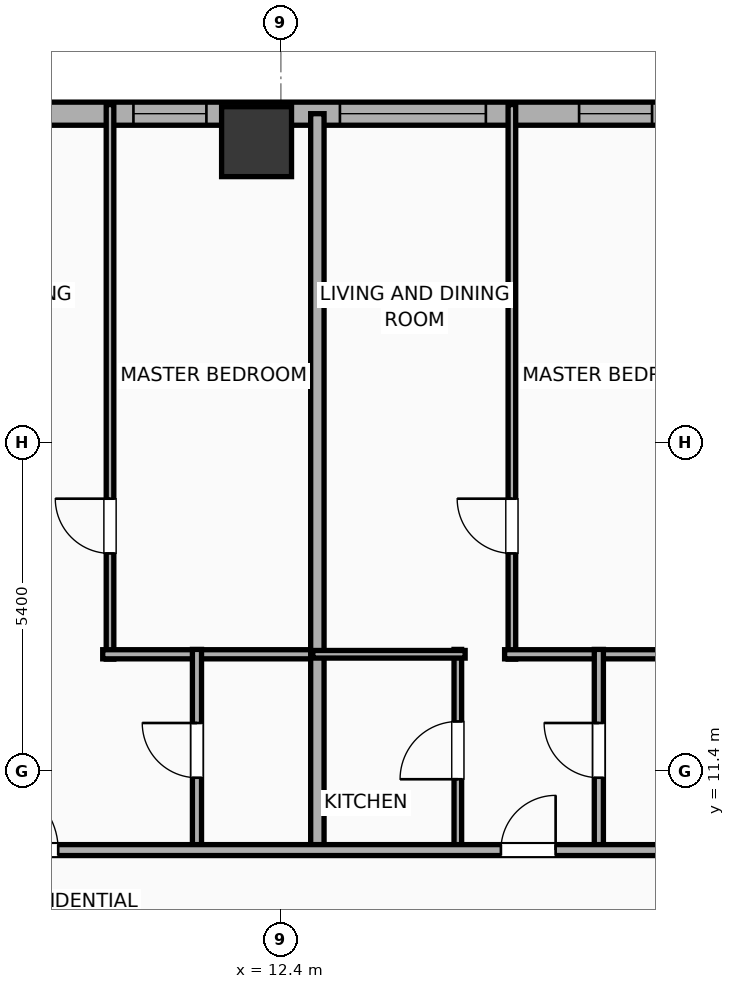
"""IFC4 building model, lengths in metres.
Left out: names, types, materials, properties, quantities, classifications, styles, units other than length and angle.
Written with IfcOpenShell. Run it as: python <this file> out.ifc"""

import sys

from ifc_helpers import new_model, si_unit, direction, frame, frame_2d, origin, origin_2d, place, context, subcontext, project, spatial, rectangle, hollow_rectangle, extrude, element, fill, save


model = new_model("IFC4")
c1 = context("Model", 3, precision=1e-05, world=origin(), true_north=direction((0.0, 1.0)))
c2 = subcontext(c1, "Body", "Model", "MODEL_VIEW")
j1 = project(units=[si_unit("LENGTHUNIT", "METRE"), si_unit("PLANEANGLEUNIT", "RADIAN")], contexts=[c1])
p1 = place(None, origin())
s1 = spatial("IfcSite", under=j1, at=p1, CompositionType="ELEMENT")
p2 = place(p1, origin())
s2 = spatial("IfcBuilding", under=s1, at=p2, CompositionType="ELEMENT")
p3 = place(p2, frame((0.0, 0.0, 45.5)))
s3 = spatial("IfcBuildingStorey", under=s2, at=p3, CompositionType="ELEMENT", Elevation=45.5)
p4 = place(p3, frame((12.0, 21.75, 0.0), z_axis=(0.0, 0.0, 1.0), x_axis=(1.0, 0.0, 0.0)))
e1 = element("IfcColumn", 1, at=p4, inside=s3, PredefinedType="COLUMN", context=c2, shape_type="SweptSolid", body=[
    extrude(hollow_rectangle(XDim=1.15, YDim=1.15, WallThickness=0.04, at=origin_2d()), origin(), (0.0, 0.0, 1.0), 3.9),
])
p5 = place(p3, frame((-29.581, 22.21, 0.0), z_axis=(0.0, 0.0, 1.0), x_axis=(1.0, 0.0, 0.0)))
e2 = element("IfcWall", 2, at=p5, inside=s3, PredefinedType="ELEMENTEDWALL", context=c2, shape_type="SweptSolid", body=[
    extrude(rectangle(XDim=51.963, YDim=0.38, at=frame_2d((25.981, 0.0))), origin(), (0.0, 0.0, 1.0), 3.65),
])
p6 = place(p5, frame((25.631, 0.0, 0.75)))
e3 = element("IfcOpeningElement", 3, at=p6, cuts=e2, PredefinedType="OPENING", context=c2, shape_type="SweptSolid", body=[
    extrude(rectangle(XDim=2.4, YDim=2.1, at=frame_2d((1.2, 1.05))), frame((0.0, 0.2, 0.0), z_axis=(0.0, -1.0, 0.0), x_axis=(1.0, 0.0, 0.0)), (0.0, 0.0, 1.0), 0.4),
])
p7 = place(p5, frame((42.952, 0.0, 0.75)))
e4 = element("IfcOpeningElement", 4, at=p7, cuts=e2, PredefinedType="OPENING", context=c2, shape_type="SweptSolid", body=[
    extrude(rectangle(XDim=2.4, YDim=2.1, at=frame_2d((1.2, 1.05))), frame((0.0, 0.2, 0.0), z_axis=(0.0, -1.0, 0.0), x_axis=(1.0, 0.0, 0.0)), (0.0, 0.0, 1.0), 0.4),
])
p8 = place(p5, frame((1.731, 0.0, 0.75)))
e5 = element("IfcOpeningElement", 5, at=p8, cuts=e2, PredefinedType="OPENING", context=c2, shape_type="SweptSolid", body=[
    extrude(rectangle(XDim=1.2, YDim=2.05, at=frame_2d((0.6, 1.025))), frame((0.0, 0.2, 0.0), z_axis=(0.0, -1.0, 0.0), x_axis=(1.0, 0.0, 0.0)), (0.0, 0.0, 1.0), 0.4),
])
p9 = place(p5, frame((5.272, 0.0, 0.75)))
e6 = element("IfcOpeningElement", 6, at=p9, cuts=e2, PredefinedType="OPENING", context=c2, shape_type="SweptSolid", body=[
    extrude(rectangle(XDim=1.2, YDim=2.05, at=frame_2d((0.6, 1.025))), frame((0.0, 0.2, 0.0), z_axis=(0.0, -1.0, 0.0), x_axis=(1.0, 0.0, 0.0)), (0.0, 0.0, 1.0), 0.4),
])
p10 = place(p5, frame((8.356, 0.0, 0.75)))
e7 = element("IfcOpeningElement", 7, at=p10, cuts=e2, PredefinedType="OPENING", context=c2, shape_type="SweptSolid", body=[
    extrude(rectangle(XDim=1.2, YDim=2.05, at=frame_2d((0.6, 1.025))), frame((0.0, 0.2, 0.0), z_axis=(0.0, -1.0, 0.0), x_axis=(1.0, 0.0, 0.0)), (0.0, 0.0, 1.0), 0.4),
])
p11 = place(p5, frame((15.632, 0.0, 0.75)))
e8 = element("IfcOpeningElement", 8, at=p11, cuts=e2, PredefinedType="OPENING", context=c2, shape_type="SweptSolid", body=[
    extrude(rectangle(XDim=1.2, YDim=2.05, at=frame_2d((0.6, 1.025))), frame((0.0, 0.2, 0.0), z_axis=(0.0, -1.0, 0.0), x_axis=(1.0, 0.0, 0.0)), (0.0, 0.0, 1.0), 0.4),
])
p12 = place(p5, frame((12.137, 0.0, 0.75)))
e9 = element("IfcOpeningElement", 9, at=p12, cuts=e2, PredefinedType="OPENING", context=c2, shape_type="SweptSolid", body=[
    extrude(rectangle(XDim=1.2, YDim=2.05, at=frame_2d((0.6, 1.025))), frame((0.0, 0.2, 0.0), z_axis=(0.0, -1.0, 0.0), x_axis=(1.0, 0.0, 0.0)), (0.0, 0.0, 1.0), 0.4),
])
p13 = place(p5, frame((18.756, 0.0, 0.75)))
e10 = element("IfcOpeningElement", 10, at=p13, cuts=e2, PredefinedType="OPENING", context=c2, shape_type="SweptSolid", body=[
    extrude(rectangle(XDim=1.2, YDim=2.05, at=frame_2d((0.6, 1.025))), frame((0.0, 0.2, 0.0), z_axis=(0.0, -1.0, 0.0), x_axis=(1.0, 0.0, 0.0)), (0.0, 0.0, 1.0), 0.4),
])
p14 = place(p5, frame((22.907, 0.0, 0.75)))
e11 = element("IfcOpeningElement", 11, at=p14, cuts=e2, PredefinedType="OPENING", context=c2, shape_type="SweptSolid", body=[
    extrude(rectangle(XDim=1.2, YDim=2.05, at=frame_2d((0.6, 1.025))), frame((0.0, 0.2, 0.0), z_axis=(0.0, -1.0, 0.0), x_axis=(1.0, 0.0, 0.0)), (0.0, 0.0, 1.0), 0.4),
])
p15 = place(p5, frame((36.381, 0.0, 0.75)))
e12 = element("IfcOpeningElement", 12, at=p15, cuts=e2, PredefinedType="OPENING", context=c2, shape_type="SweptSolid", body=[
    extrude(rectangle(XDim=1.2, YDim=2.05, at=frame_2d((0.6, 1.025))), frame((0.0, 0.2, 0.0), z_axis=(0.0, -1.0, 0.0), x_axis=(1.0, 0.0, 0.0)), (0.0, 0.0, 1.0), 0.4),
])
p16 = place(p5, frame((32.886, 0.0, 0.75)))
e13 = element("IfcOpeningElement", 13, at=p16, cuts=e2, PredefinedType="OPENING", context=c2, shape_type="SweptSolid", body=[
    extrude(rectangle(XDim=1.2, YDim=2.05, at=frame_2d((0.6, 1.025))), frame((0.0, 0.2, 0.0), z_axis=(0.0, -1.0, 0.0), x_axis=(1.0, 0.0, 0.0)), (0.0, 0.0, 1.0), 0.4),
])
p17 = place(p5, frame((39.556, 0.0, 0.75)))
e14 = element("IfcOpeningElement", 14, at=p17, cuts=e2, PredefinedType="OPENING", context=c2, shape_type="SweptSolid", body=[
    extrude(rectangle(XDim=1.2, YDim=2.05, at=frame_2d((0.6, 1.025))), frame((0.0, 0.2, 0.0), z_axis=(0.0, -1.0, 0.0), x_axis=(1.0, 0.0, 0.0)), (0.0, 0.0, 1.0), 0.4),
])
p18 = place(p5, frame((46.885, 0.0, 0.75)))
e15 = element("IfcOpeningElement", 15, at=p18, cuts=e2, PredefinedType="OPENING", context=c2, shape_type="SweptSolid", body=[
    extrude(rectangle(XDim=1.2, YDim=2.05, at=frame_2d((0.6, 1.025))), frame((0.0, 0.2, 0.0), z_axis=(0.0, -1.0, 0.0), x_axis=(1.0, 0.0, 0.0)), (0.0, 0.0, 1.0), 0.4),
])
p19 = place(p5, frame((49.531, 0.0, 0.75)))
e16 = element("IfcOpeningElement", 16, at=p19, cuts=e2, PredefinedType="OPENING", context=c2, shape_type="SweptSolid", body=[
    extrude(rectangle(XDim=1.2, YDim=2.05, at=frame_2d((0.6, 1.025))), frame((0.0, 0.2, 0.0), z_axis=(0.0, -1.0, 0.0), x_axis=(1.0, 0.0, 0.0)), (0.0, 0.0, 1.0), 0.4),
])
p20 = place(p3, frame((9.59, 13.24, 0.0), z_axis=(0.0, 0.0, 1.0), x_axis=(0.0, 1.0, 0.0)))
e17 = element("IfcWall", 17, at=p20, inside=s3, PredefinedType="PARTITIONING", context=c2, shape_type="SweptSolid", body=[
    extrude(rectangle(XDim=9.12, YDim=0.125, at=frame_2d((4.56, 0.0))), origin(), (0.0, 0.0, 1.0), 3.65),
])
p21 = place(p20, frame((1.739, 0.0, 0.0)))
e18 = element("IfcOpeningElement", 18, at=p21, cuts=e17, PredefinedType="OPENING", context=c2, shape_type="SweptSolid", body=[
    extrude(rectangle(XDim=0.9, YDim=2.05, at=frame_2d((0.45, 1.025))), frame((0.0, 0.073, 0.0), z_axis=(0.0, -1.0, 0.0), x_axis=(1.0, 0.0, 0.0)), (0.0, 0.0, 1.0), 0.145),
])
p22 = place(p3, frame((9.47, 13.32, 0.0), z_axis=(0.0, 0.0, 1.0), x_axis=(1.0, 0.0, 0.0)))
e19 = element("IfcWall", 19, at=p22, inside=s3, PredefinedType="PLUMBINGWALL", context=c2, shape_type="SweptSolid", body=[
    extrude(rectangle(XDim=3.605, YDim=0.15, at=frame_2d((1.802, 0.0))), origin(), (0.0, 0.0, 1.0), 3.65),
])
p23 = place(p3, frame((11.02, 10.08, 0.0), z_axis=(0.0, 0.0, 1.0), x_axis=(0.0, 1.0, 0.0)))
e20 = element("IfcWall", 20, at=p23, inside=s3, PredefinedType="PLUMBINGWALL", context=c2, shape_type="SweptSolid", body=[
    extrude(rectangle(XDim=3.32, YDim=0.15, at=frame_2d((1.66, 0.0))), origin(), (0.0, 0.0, 1.0), 3.65),
])
p24 = place(p23, frame((1.21, 0.0, 0.0)))
e21 = element("IfcOpeningElement", 21, at=p24, cuts=e20, PredefinedType="OPENING", context=c2, shape_type="SweptSolid", body=[
    extrude(rectangle(XDim=0.9, YDim=2.05, at=frame_2d((0.45, 1.025))), frame((0.0, 0.085, 0.0), z_axis=(0.0, -1.0, 0.0), x_axis=(1.0, 0.0, 0.0)), (0.0, 0.0, 1.0), 0.17),
])
p25 = place(p3, frame((13.0, 10.02, 0.0), z_axis=(0.0, 0.0, 1.0), x_axis=(0.0, 1.0, 0.0)))
e22 = element("IfcWall", 22, at=p25, inside=s3, PredefinedType="PARTITIONING", context=c2, shape_type="SweptSolid", body=[
    extrude(rectangle(XDim=12.19, YDim=0.22, at=frame_2d((6.095, 0.0))), origin(), (0.0, 0.0, 1.0), 3.65),
])
p26 = place(p3, frame((16.199, 13.24, 0.0), z_axis=(0.0, 0.0, 1.0), x_axis=(0.0, 1.0, 0.0)))
e23 = element("IfcWall", 23, at=p26, inside=s3, PredefinedType="PARTITIONING", context=c2, shape_type="SweptSolid", body=[
    extrude(rectangle(XDim=9.12, YDim=0.125, at=frame_2d((4.56, 0.0))), origin(), (0.0, 0.0, 1.0), 3.65),
])
p27 = place(p26, frame((1.739, 0.0, 0.0)))
e24 = element("IfcOpeningElement", 24, at=p27, cuts=e23, PredefinedType="OPENING", context=c2, shape_type="SweptSolid", body=[
    extrude(rectangle(XDim=0.9, YDim=2.05, at=frame_2d((0.45, 1.025))), frame((0.0, 0.073, 0.0), z_axis=(0.0, -1.0, 0.0), x_axis=(1.0, 0.0, 0.0)), (0.0, 0.0, 1.0), 0.145),
])
p28 = place(p3, frame((16.079, 13.32, 0.0), z_axis=(0.0, 0.0, 1.0), x_axis=(1.0, 0.0, 0.0)))
e25 = element("IfcWall", 25, at=p28, inside=s3, PredefinedType="PLUMBINGWALL", context=c2, shape_type="SweptSolid", body=[
    extrude(rectangle(XDim=3.605, YDim=0.15, at=frame_2d((1.802, 0.0))), origin(), (0.0, 0.0, 1.0), 3.65),
])
p29 = place(p3, frame((15.31, 10.08, 0.0), z_axis=(0.0, 0.0, 1.0), x_axis=(0.0, 1.0, 0.0)))
e26 = element("IfcWall", 26, at=p29, inside=s3, PredefinedType="PARTITIONING", context=c2, shape_type="SweptSolid", body=[
    extrude(rectangle(XDim=3.32, YDim=0.125, at=frame_2d((1.66, 0.0))), origin(), (0.0, 0.0, 1.0), 3.65),
])
p30 = place(p29, frame((1.185, 0.0, 0.0)))
e27 = element("IfcOpeningElement", 27, at=p30, cuts=e26, PredefinedType="OPENING", context=c2, shape_type="SweptSolid", body=[
    extrude(rectangle(XDim=0.95, YDim=2.05, at=frame_2d((0.475, 1.025))), frame((0.0, 0.073, 0.0), z_axis=(0.0, -1.0, 0.0), x_axis=(1.0, 0.0, 0.0)), (0.0, 0.0, 1.0), 0.145),
])
p31 = place(p3, frame((12.925, 13.32, 0.0), z_axis=(0.0, 0.0, 1.0), x_axis=(1.0, 0.0, 0.0)))
e28 = element("IfcWall", 28, at=p31, inside=s3, PredefinedType="PARTITIONING", context=c2, shape_type="SweptSolid", body=[
    extrude(rectangle(XDim=2.505, YDim=0.125, at=frame_2d((1.252, 0.0))), origin(), (0.0, 0.0, 1.0), 3.65),
])
p32 = place(p3, frame((17.629, 10.08, 0.0), z_axis=(0.0, 0.0, 1.0), x_axis=(0.0, 1.0, 0.0)))
e29 = element("IfcWall", 29, at=p32, inside=s3, PredefinedType="PLUMBINGWALL", context=c2, shape_type="SweptSolid", body=[
    extrude(rectangle(XDim=3.32, YDim=0.15, at=frame_2d((1.66, 0.0))), origin(), (0.0, 0.0, 1.0), 3.65),
])
p33 = place(p32, frame((1.21, 0.0, 0.0)))
e30 = element("IfcOpeningElement", 30, at=p33, cuts=e29, PredefinedType="OPENING", context=c2, shape_type="SweptSolid", body=[
    extrude(rectangle(XDim=0.9, YDim=2.05, at=frame_2d((0.45, 1.025))), frame((0.0, 0.085, 0.0), z_axis=(0.0, -1.0, 0.0), x_axis=(1.0, 0.0, 0.0)), (0.0, 0.0, 1.0), 0.17),
])
p34 = place(p3, frame((-33.41, 10.1, 0.0), z_axis=(0.0, 0.0, 1.0), x_axis=(1.0, 0.0, 0.0)))
e31 = element("IfcWall", 31, at=p34, inside=s3, PredefinedType="PARTITIONING", context=c2, shape_type="SweptSolid", body=[
    extrude(rectangle(XDim=59.62, YDim=0.18, at=frame_2d((29.81, 0.0))), origin(), (0.0, 0.0, 1.0), 3.65),
])
p35 = place(p34, frame((3.354, 0.0, 0.0)))
e32 = element("IfcOpeningElement", 32, at=p35, cuts=e31, PredefinedType="OPENING", context=c2, shape_type="SweptSolid", body=[
    extrude(rectangle(XDim=1.15, YDim=2.05, at=frame_2d((0.575, 1.025))), frame((0.0, 0.1, 0.0), z_axis=(0.0, -1.0, 0.0), x_axis=(1.0, 0.0, 0.0)), (0.0, 0.0, 1.0), 0.2),
])
p36 = place(p34, frame((10.997, 0.0, 0.0)))
e33 = element("IfcOpeningElement", 33, at=p36, cuts=e31, PredefinedType="OPENING", context=c2, shape_type="SweptSolid", body=[
    extrude(rectangle(XDim=1.15, YDim=2.05, at=frame_2d((0.575, 1.025))), frame((0.0, 0.1, 0.0), z_axis=(0.0, -1.0, 0.0), x_axis=(1.0, 0.0, 0.0)), (0.0, 0.0, 1.0), 0.2),
])
p37 = place(p34, frame((20.232, 0.0, 0.0)))
e34 = element("IfcOpeningElement", 34, at=p37, cuts=e31, PredefinedType="OPENING", context=c2, shape_type="SweptSolid", body=[
    extrude(rectangle(XDim=1.15, YDim=2.05, at=frame_2d((0.575, 1.025))), frame((0.0, 0.1, 0.0), z_axis=(0.0, -1.0, 0.0), x_axis=(1.0, 0.0, 0.0)), (0.0, 0.0, 1.0), 0.2),
])
p38 = place(p34, frame((30.38, 0.0, 0.0)))
e35 = element("IfcOpeningElement", 35, at=p38, cuts=e31, PredefinedType="OPENING", context=c2, shape_type="SweptSolid", body=[
    extrude(rectangle(XDim=1.15, YDim=2.05, at=frame_2d((0.575, 1.025))), frame((0.0, 0.1, 0.0), z_axis=(0.0, -1.0, 0.0), x_axis=(1.0, 0.0, 0.0)), (0.0, 0.0, 1.0), 0.2),
])
p39 = place(p34, frame((40.998, 0.0, 0.0)))
e36 = element("IfcOpeningElement", 36, at=p39, cuts=e31, PredefinedType="OPENING", context=c2, shape_type="SweptSolid", body=[
    extrude(rectangle(XDim=1.15, YDim=2.05, at=frame_2d((0.575, 1.025))), frame((0.0, 0.1, 0.0), z_axis=(0.0, -1.0, 0.0), x_axis=(1.0, 0.0, 0.0)), (0.0, 0.0, 1.0), 0.2),
])
p40 = place(p34, frame((49.428, 0.0, 0.0)))
e37 = element("IfcOpeningElement", 37, at=p40, cuts=e31, PredefinedType="OPENING", context=c2, shape_type="SweptSolid", body=[
    extrude(rectangle(XDim=0.9, YDim=2.05, at=frame_2d((0.45, 1.025))), frame((0.0, 0.1, 0.0), z_axis=(0.0, -1.0, 0.0), x_axis=(1.0, 0.0, 0.0)), (0.0, 0.0, 1.0), 0.2),
])
p41 = place(p34, frame((56.07, 0.0, 0.0)))
e38 = element("IfcOpeningElement", 38, at=p41, cuts=e31, PredefinedType="OPENING", context=c2, shape_type="SweptSolid", body=[
    extrude(rectangle(XDim=0.9, YDim=2.05, at=frame_2d((0.45, 1.025))), frame((0.0, 0.1, 0.0), z_axis=(0.0, -1.0, 0.0), x_axis=(1.0, 0.0, 0.0)), (0.0, 0.0, 1.0), 0.2),
])
p42 = place(p7, origin())
e39 = element("IfcWindow", 39, at=p42, inside=s3, PartitioningType="SINGLE_PANEL", PredefinedType="WINDOW", context=c2, shape_type="SweptSolid", body=[
    extrude(rectangle(XDim=2.4, YDim=2.1, at=frame_2d((1.2, 1.05))), frame((0.0, 0.03, 0.0), z_axis=(0.0, -1.0, 0.0), x_axis=(1.0, 0.0, 0.0)), (0.0, 0.0, 1.0), 0.06),
])
fill(e4, e39)
p43 = place(p17, origin())
e40 = element("IfcWindow", 40, at=p43, inside=s3, PartitioningType="SINGLE_PANEL", PredefinedType="WINDOW", context=c2, shape_type="SweptSolid", body=[
    extrude(rectangle(XDim=1.2, YDim=2.05, at=frame_2d((0.6, 1.025))), frame((0.0, 0.03, 0.0), z_axis=(0.0, -1.0, 0.0), x_axis=(1.0, 0.0, 0.0)), (0.0, 0.0, 1.0), 0.06),
])
fill(e14, e40)
p44 = place(p18, origin())
e41 = element("IfcWindow", 41, at=p44, inside=s3, PartitioningType="SINGLE_PANEL", PredefinedType="WINDOW", context=c2, shape_type="SweptSolid", body=[
    extrude(rectangle(XDim=1.2, YDim=2.05, at=frame_2d((0.6, 1.025))), frame((0.0, 0.03, 0.0), z_axis=(0.0, -1.0, 0.0), x_axis=(1.0, 0.0, 0.0)), (0.0, 0.0, 1.0), 0.06),
])
fill(e15, e41)
p45 = place(p21, origin())
e42 = element("IfcDoor", 42, at=p45, inside=s3, OperationType="SINGLE_SWING_RIGHT", PredefinedType="DOOR", context=c2, shape_type="SweptSolid", body=[
    extrude(rectangle(XDim=0.9, YDim=2.05, at=frame_2d((0.45, 1.025))), frame((0.0, 0.025, 0.0), z_axis=(0.0, -1.0, 0.0), x_axis=(1.0, 0.0, 0.0)), (0.0, 0.0, 1.0), 0.05),
])
fill(e18, e42)
p46 = place(p24, origin())
e43 = element("IfcDoor", 43, at=p46, inside=s3, OperationType="SINGLE_SWING_RIGHT", PredefinedType="DOOR", context=c2, shape_type="SweptSolid", body=[
    extrude(rectangle(XDim=0.9, YDim=2.05, at=frame_2d((0.45, 1.025))), frame((0.0, 0.025, 0.0), z_axis=(0.0, -1.0, 0.0), x_axis=(1.0, 0.0, 0.0)), (0.0, 0.0, 1.0), 0.05),
])
fill(e21, e43)
p47 = place(p27, origin())
e44 = element("IfcDoor", 44, at=p47, inside=s3, OperationType="SINGLE_SWING_RIGHT", PredefinedType="DOOR", context=c2, shape_type="SweptSolid", body=[
    extrude(rectangle(XDim=0.9, YDim=2.05, at=frame_2d((0.45, 1.025))), frame((0.0, 0.025, 0.0), z_axis=(0.0, -1.0, 0.0), x_axis=(1.0, 0.0, 0.0)), (0.0, 0.0, 1.0), 0.05),
])
fill(e24, e44)
p48 = place(p30, origin())
e45 = element("IfcDoor", 45, at=p48, inside=s3, OperationType="SINGLE_SWING_LEFT", PredefinedType="DOOR", context=c2, shape_type="SweptSolid", body=[
    extrude(rectangle(XDim=0.95, YDim=2.05, at=frame_2d((0.475, 1.025))), frame((0.0, 0.025, 0.0), z_axis=(0.0, -1.0, 0.0), x_axis=(1.0, 0.0, 0.0)), (0.0, 0.0, 1.0), 0.05),
])
fill(e27, e45)
p49 = place(p33, origin())
e46 = element("IfcDoor", 46, at=p49, inside=s3, OperationType="SINGLE_SWING_RIGHT", PredefinedType="DOOR", context=c2, shape_type="SweptSolid", body=[
    extrude(rectangle(XDim=0.9, YDim=2.05, at=frame_2d((0.45, 1.025))), frame((0.0, 0.025, 0.0), z_axis=(0.0, -1.0, 0.0), x_axis=(1.0, 0.0, 0.0)), (0.0, 0.0, 1.0), 0.05),
])
fill(e30, e46)
p50 = place(p39, origin())
e47 = element("IfcDoor", 47, at=p50, inside=s3, OperationType="SINGLE_SWING_LEFT", PredefinedType="DOOR", context=c2, shape_type="SweptSolid", body=[
    extrude(rectangle(XDim=1.15, YDim=2.05, at=frame_2d((0.575, 1.025))), frame((0.0, 0.025, 0.0), z_axis=(0.0, -1.0, 0.0), x_axis=(1.0, 0.0, 0.0)), (0.0, 0.0, 1.0), 0.05),
])
fill(e36, e47)
p51 = place(p40, origin())
e48 = element("IfcDoor", 48, at=p51, inside=s3, OperationType="SINGLE_SWING_RIGHT", PredefinedType="DOOR", context=c2, shape_type="SweptSolid", body=[
    extrude(rectangle(XDim=0.9, YDim=2.05, at=frame_2d((0.45, 1.025))), frame((0.0, 0.025, 0.0), z_axis=(0.0, -1.0, 0.0), x_axis=(1.0, 0.0, 0.0)), (0.0, 0.0, 1.0), 0.05),
])
fill(e37, e48)
save(model, sys.argv[1])
